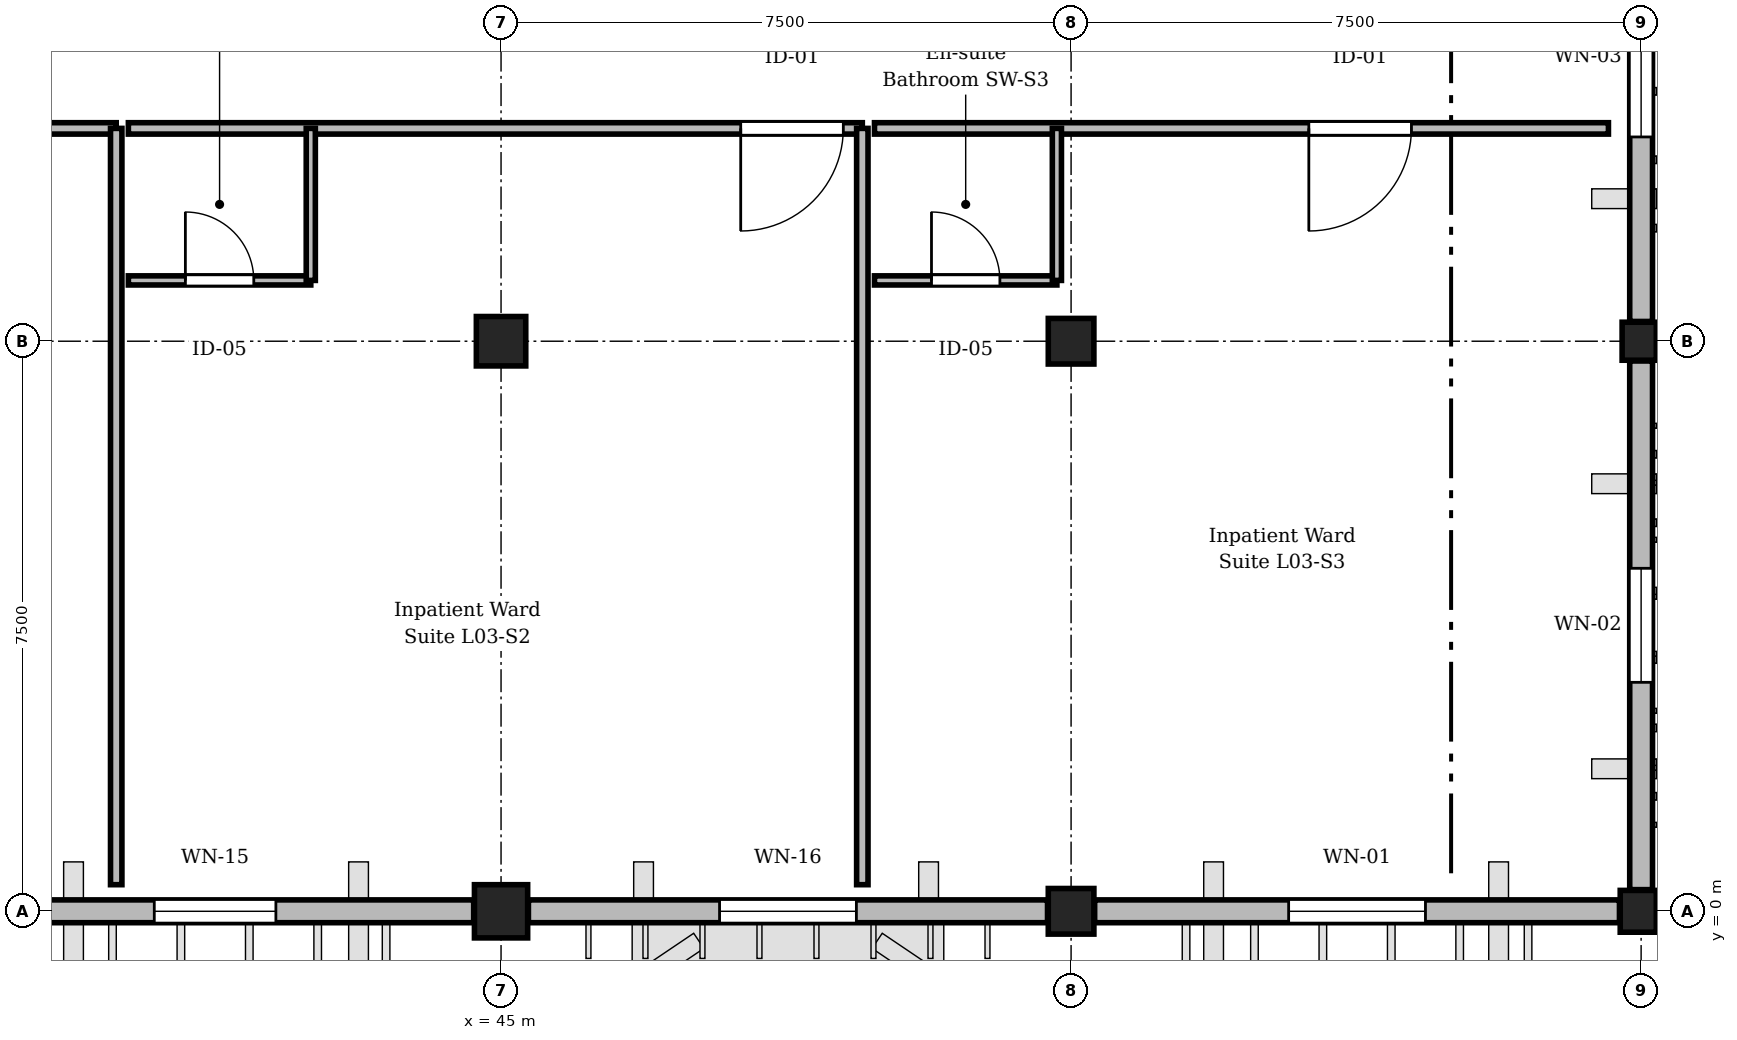
"""IFC4 building model, lengths in metres.
Left out: names, types, materials, properties, quantities, classifications, styles, units other than length and angle.
Written with IfcOpenShell. Run it as: python <this file> out.ifc"""

import sys

from ifc_helpers import new_model, si_unit, direction, frame, frame_2d, origin, origin_2d, place, context, subcontext, project, spatial, rectangle, extrude, element, fill, save


model = new_model("IFC4")
c1 = context("Model", 3, precision=1e-05, world=origin(), true_north=direction((0.0, 1.0)))
c2 = subcontext(c1, "Body", "Model", "MODEL_VIEW")
j1 = project(units=[si_unit("LENGTHUNIT", "METRE"), si_unit("PLANEANGLEUNIT", "RADIAN")], contexts=[c1])
p1 = place(None, origin())
s1 = spatial("IfcSite", under=j1, at=p1, CompositionType="ELEMENT")
p2 = place(p1, origin())
s2 = spatial("IfcBuilding", under=s1, at=p2, CompositionType="ELEMENT")
p3 = place(p2, frame((0.0, 0.0, 14.1)))
s3 = spatial("IfcBuildingStorey", under=s2, at=p3, CompositionType="ELEMENT", Elevation=14.1)
p4 = place(p3, frame((45.0, 0.0, 0.0), z_axis=(0.0, 0.0, 1.0), x_axis=(1.0, 0.0, 0.0)))
e1 = element("IfcColumn", 1, at=p4, inside=s3, PredefinedType="COLUMN", context=c2, shape_type="SweptSolid", body=[
    extrude(rectangle(XDim=0.7, YDim=0.7, at=origin_2d()), origin(), (0.0, 0.0, 1.0), 3.75),
])
p5 = place(p3, frame((45.0, 7.5, 0.0), z_axis=(0.0, 0.0, 1.0), x_axis=(1.0, 0.0, 0.0)))
e2 = element("IfcColumn", 2, at=p5, inside=s3, PredefinedType="COLUMN", context=c2, shape_type="SweptSolid", body=[
    extrude(rectangle(XDim=0.65, YDim=0.65, at=origin_2d()), origin(), (0.0, 0.0, 1.0), 3.75),
])
for number, where, z_axis, x_axis in (
    (3, (52.5, 0.0, 0.0), (0.0, 0.0, 1.0), (1.0, 0.0, 0.0)),
    (4, (52.5, 7.5, 0.0), (0.0, 0.0, 1.0), (1.0, 0.0, 0.0)),
):
    element("IfcColumn", number, at=place(p3, frame(where, z_axis=z_axis, x_axis=x_axis)), inside=s3, PredefinedType="COLUMN", context=c2, shape_type="SweptSolid", body=[
        extrude(rectangle(XDim=0.6, YDim=0.6, at=origin_2d()), origin(), (0.0, 0.0, 1.0), 3.75),
    ])
p6 = place(p3, frame((60.0, 0.0, 0.0), z_axis=(0.0, 0.0, 1.0), x_axis=(1.0, 0.0, 0.0)))
e5 = element("IfcColumn", 5, at=p6, inside=s3, PredefinedType="COLUMN", context=c2, shape_type="SweptSolid", body=[
    extrude(rectangle(XDim=0.55, YDim=0.55, at=origin_2d()), origin(), (0.0, 0.0, 1.0), 3.75),
])
p7 = place(p3, frame((60.0, 7.5, 0.0), z_axis=(0.0, 0.0, 1.0), x_axis=(1.0, 0.0, 0.0)))
e6 = element("IfcColumn", 6, at=p7, inside=s3, PredefinedType="COLUMN", context=c2, shape_type="SweptSolid", body=[
    extrude(rectangle(XDim=0.5, YDim=0.5, at=origin_2d()), origin(), (0.0, 0.0, 1.0), 3.75),
])
p8 = place(p3, frame((44.64, 0.0, 0.0), z_axis=(0.0, 0.0, 1.0), x_axis=(-1.0, 0.0, 0.0)))
e7 = element("IfcWall", 7, at=p8, inside=s3, PredefinedType="STANDARD", context=c2, shape_type="SweptSolid", body=[
    extrude(rectangle(XDim=6.805, YDim=0.3, at=frame_2d((3.402, 0.0))), origin(), (0.0, 0.0, 1.0), 2.87),
])
p9 = place(p8, frame((2.603, 0.0, 0.9)))
e8 = element("IfcOpeningElement", 8, at=p9, cuts=e7, PredefinedType="OPENING", context=c2, shape_type="SweptSolid", body=[
    extrude(rectangle(XDim=1.6, YDim=1.69, at=frame_2d((0.8, 0.845))), frame((0.0, 0.16, 0.0), z_axis=(0.0, -1.0, 0.0), x_axis=(1.0, 0.0, 0.0)), (0.0, 0.0, 1.0), 0.32),
])
p10 = place(p3, frame((52.19, 0.0, 0.0), z_axis=(0.0, 0.0, 1.0), x_axis=(-1.0, 0.0, 0.0)))
e9 = element("IfcWall", 9, at=p10, inside=s3, PredefinedType="STANDARD", context=c2, shape_type="SweptSolid", body=[
    extrude(rectangle(XDim=6.83, YDim=0.3, at=frame_2d((3.415, 0.0))), origin(), (0.0, 0.0, 1.0), 2.87),
])
p11 = place(p10, frame((2.515, 0.0, 0.9)))
e10 = element("IfcOpeningElement", 10, at=p11, cuts=e9, PredefinedType="OPENING", context=c2, shape_type="SweptSolid", body=[
    extrude(rectangle(XDim=1.8, YDim=1.69, at=frame_2d((0.9, 0.845))), frame((0.0, 0.16, 0.0), z_axis=(0.0, -1.0, 0.0), x_axis=(1.0, 0.0, 0.0)), (0.0, 0.0, 1.0), 0.32),
])
p12 = place(p3, frame((59.715, 0.0, 0.0), z_axis=(0.0, 0.0, 1.0), x_axis=(-1.0, 0.0, 0.0)))
e11 = element("IfcWall", 11, at=p12, inside=s3, PredefinedType="STANDARD", context=c2, shape_type="SweptSolid", body=[
    extrude(rectangle(XDim=6.905, YDim=0.3, at=frame_2d((3.453, 0.0))), origin(), (0.0, 0.0, 1.0), 2.87),
])
p13 = place(p12, frame((2.552, 0.0, 0.9)))
e12 = element("IfcOpeningElement", 12, at=p13, cuts=e11, PredefinedType="OPENING", context=c2, shape_type="SweptSolid", body=[
    extrude(rectangle(XDim=1.8, YDim=1.69, at=frame_2d((0.9, 0.845))), frame((0.0, 0.16, 0.0), z_axis=(0.0, -1.0, 0.0), x_axis=(1.0, 0.0, 0.0)), (0.0, 0.0, 1.0), 0.32),
])
p14 = place(p3, frame((60.0, 7.24, 0.0), z_axis=(0.0, 0.0, 1.0), x_axis=(0.0, -1.0, 0.0)))
e13 = element("IfcWall", 13, at=p14, inside=s3, PredefinedType="STANDARD", context=c2, shape_type="SweptSolid", body=[
    extrude(rectangle(XDim=6.955, YDim=0.3, at=frame_2d((3.478, 0.0))), origin(), (0.0, 0.0, 1.0), 2.87),
])
p15 = place(p14, frame((2.728, 0.0, 0.9)))
e14 = element("IfcOpeningElement", 14, at=p15, cuts=e13, PredefinedType="OPENING", context=c2, shape_type="SweptSolid", body=[
    extrude(rectangle(XDim=1.5, YDim=1.69, at=frame_2d((0.75, 0.845))), frame((0.0, 0.16, 0.0), z_axis=(0.0, -1.0, 0.0), x_axis=(1.0, 0.0, 0.0)), (0.0, 0.0, 1.0), 0.32),
])
p16 = place(p3, frame((60.0, 14.715, 0.0), z_axis=(0.0, 0.0, 1.0), x_axis=(0.0, -1.0, 0.0)))
e15 = element("IfcWall", 15, at=p16, inside=s3, PredefinedType="STANDARD", context=c2, shape_type="SweptSolid", body=[
    extrude(rectangle(XDim=6.955, YDim=0.3, at=frame_2d((3.478, 0.0))), origin(), (0.0, 0.0, 1.0), 2.87),
])
p17 = place(p16, frame((2.427, 0.0, 0.9)))
e16 = element("IfcOpeningElement", 16, at=p17, cuts=e15, PredefinedType="OPENING", context=c2, shape_type="SweptSolid", body=[
    extrude(rectangle(XDim=2.1, YDim=1.69, at=frame_2d((1.05, 0.845))), frame((0.0, 0.16, 0.0), z_axis=(0.0, -1.0, 0.0), x_axis=(1.0, 0.0, 0.0)), (0.0, 0.0, 1.0), 0.32),
])
p18 = place(p3, frame((39.937, 10.3, 0.0), z_axis=(0.0, 0.0, 1.0), x_axis=(-1.0, 0.0, 0.0)))
e17 = element("IfcWall", 17, at=p18, inside=s3, PredefinedType="PARTITIONING", context=c2, shape_type="SweptSolid", body=[
    extrude(rectangle(XDim=9.657, YDim=0.15, at=frame_2d((4.828, 0.0))), origin(), (0.0, 0.0, 1.0), 3.455),
])
p19 = place(p18, frame((4.934, 0.0, 0.0)))
e18 = element("IfcOpeningElement", 18, at=p19, cuts=e17, PredefinedType="OPENING", context=c2, shape_type="SweptSolid", body=[
    extrude(rectangle(XDim=1.35, YDim=2.25, at=frame_2d((0.675, 1.125))), frame((0.0, 0.085, 0.0), z_axis=(0.0, -1.0, 0.0), x_axis=(1.0, 0.0, 0.0)), (0.0, 0.0, 1.0), 0.17),
])
p20 = place(p3, frame((49.753, 10.3, 0.0), z_axis=(0.0, 0.0, 1.0), x_axis=(-1.0, 0.0, 0.0)))
e19 = element("IfcWall", 19, at=p20, inside=s3, PredefinedType="PARTITIONING", context=c2, shape_type="SweptSolid", body=[
    extrude(rectangle(XDim=9.657, YDim=0.15, at=frame_2d((4.828, 0.0))), origin(), (0.0, 0.0, 1.0), 3.455),
])
p21 = place(p20, frame((0.25, 0.0, 0.0)))
e20 = element("IfcOpeningElement", 20, at=p21, cuts=e19, PredefinedType="OPENING", context=c2, shape_type="SweptSolid", body=[
    extrude(rectangle(XDim=1.35, YDim=2.25, at=frame_2d((0.675, 1.125))), frame((0.0, 0.085, 0.0), z_axis=(0.0, -1.0, 0.0), x_axis=(1.0, 0.0, 0.0)), (0.0, 0.0, 1.0), 0.17),
])
p22 = place(p3, frame((40.097, 8.3, 0.0), z_axis=(0.0, 0.0, 1.0), x_axis=(1.0, 0.0, 0.0)))
e21 = element("IfcWall", 21, at=p22, inside=s3, PredefinedType="PARTITIONING", context=c2, shape_type="SweptSolid", body=[
    extrude(rectangle(XDim=2.4, YDim=0.12, at=frame_2d((1.2, 0.0))), origin(), (0.0, 0.0, 1.0), 3.455),
])
p23 = place(p22, frame((0.75, 0.0, 0.0)))
e22 = element("IfcOpeningElement", 22, at=p23, cuts=e21, PredefinedType="OPENING", context=c2, shape_type="SweptSolid", body=[
    extrude(rectangle(XDim=0.9, YDim=2.1, at=frame_2d((0.45, 1.05))), frame((0.0, 0.07, 0.0), z_axis=(0.0, -1.0, 0.0), x_axis=(1.0, 0.0, 0.0)), (0.0, 0.0, 1.0), 0.14),
])
p24 = place(p3, frame((42.497, 8.3, 0.0), z_axis=(0.0, 0.0, 1.0), x_axis=(0.0, 1.0, 0.0)))
e23 = element("IfcWall", 23, at=p24, inside=s3, PredefinedType="PARTITIONING", context=c2, shape_type="SweptSolid", body=[
    extrude(rectangle(XDim=2.0, YDim=0.12, at=frame_2d((1.0, 0.0))), origin(), (0.0, 0.0, 1.0), 3.455),
])
p25 = place(p3, frame((59.57, 10.3, 0.0), z_axis=(0.0, 0.0, 1.0), x_axis=(-1.0, 0.0, 0.0)))
e24 = element("IfcWall", 24, at=p25, inside=s3, PredefinedType="PARTITIONING", context=c2, shape_type="SweptSolid", body=[
    extrude(rectangle(XDim=9.657, YDim=0.15, at=frame_2d((4.828, 0.0))), origin(), (0.0, 0.0, 1.0), 3.455),
])
p26 = place(p25, frame((2.592, 0.0, 0.0)))
e25 = element("IfcOpeningElement", 25, at=p26, cuts=e24, PredefinedType="OPENING", context=c2, shape_type="SweptSolid", body=[
    extrude(rectangle(XDim=1.35, YDim=2.25, at=frame_2d((0.675, 1.125))), frame((0.0, 0.085, 0.0), z_axis=(0.0, -1.0, 0.0), x_axis=(1.0, 0.0, 0.0)), (0.0, 0.0, 1.0), 0.17),
])
p27 = place(p3, frame((49.913, 8.3, 0.0), z_axis=(0.0, 0.0, 1.0), x_axis=(1.0, 0.0, 0.0)))
e26 = element("IfcWall", 26, at=p27, inside=s3, PredefinedType="PARTITIONING", context=c2, shape_type="SweptSolid", body=[
    extrude(rectangle(XDim=2.4, YDim=0.12, at=frame_2d((1.2, 0.0))), origin(), (0.0, 0.0, 1.0), 3.455),
])
p28 = place(p27, frame((0.75, 0.0, 0.0)))
e27 = element("IfcOpeningElement", 27, at=p28, cuts=e26, PredefinedType="OPENING", context=c2, shape_type="SweptSolid", body=[
    extrude(rectangle(XDim=0.9, YDim=2.1, at=frame_2d((0.45, 1.05))), frame((0.0, 0.07, 0.0), z_axis=(0.0, -1.0, 0.0), x_axis=(1.0, 0.0, 0.0)), (0.0, 0.0, 1.0), 0.14),
])
p29 = place(p3, frame((52.313, 8.3, 0.0), z_axis=(0.0, 0.0, 1.0), x_axis=(0.0, 1.0, 0.0)))
e28 = element("IfcWall", 28, at=p29, inside=s3, PredefinedType="PARTITIONING", context=c2, shape_type="SweptSolid", body=[
    extrude(rectangle(XDim=2.0, YDim=0.12, at=frame_2d((1.0, 0.0))), origin(), (0.0, 0.0, 1.0), 2.905),
])
for number, where, z_axis, x_axis in (
    (29, (39.937, 0.35, 0.0), (0.0, 0.0, 1.0), (0.0, 1.0, 0.0)),
    (30, (49.753, 0.35, 0.0), (0.0, 0.0, 1.0), (0.0, 1.0, 0.0)),
):
    element("IfcWall", number, at=place(p3, frame(where, z_axis=z_axis, x_axis=x_axis)), inside=s3, PredefinedType="PARTITIONING", context=c2, shape_type="SweptSolid", body=[
        extrude(rectangle(XDim=9.95, YDim=0.15, at=frame_2d((4.975, 0.0))), origin(), (0.0, 0.0, 1.0), 3.455),
    ])
p30 = place(p9, origin())
e31 = element("IfcWindow", 31, at=p30, inside=s3, PartitioningType="SINGLE_PANEL", PredefinedType="WINDOW", context=c2, shape_type="SweptSolid", body=[
    extrude(rectangle(XDim=1.6, YDim=1.69, at=frame_2d((0.8, 0.845))), frame((0.0, 0.03, 0.0), z_axis=(0.0, -1.0, 0.0), x_axis=(1.0, 0.0, 0.0)), (0.0, 0.0, 1.0), 0.06),
])
fill(e8, e31)
p31 = place(p11, origin())
e32 = element("IfcWindow", 32, at=p31, inside=s3, PartitioningType="SINGLE_PANEL", PredefinedType="WINDOW", context=c2, shape_type="SweptSolid", body=[
    extrude(rectangle(XDim=1.8, YDim=1.69, at=frame_2d((0.9, 0.845))), frame((0.0, 0.03, 0.0), z_axis=(0.0, -1.0, 0.0), x_axis=(1.0, 0.0, 0.0)), (0.0, 0.0, 1.0), 0.06),
])
fill(e10, e32)
p32 = place(p13, origin())
e33 = element("IfcWindow", 33, at=p32, inside=s3, PartitioningType="SINGLE_PANEL", PredefinedType="WINDOW", context=c2, shape_type="SweptSolid", body=[
    extrude(rectangle(XDim=1.8, YDim=1.69, at=frame_2d((0.9, 0.845))), frame((0.0, 0.03, 0.0), z_axis=(0.0, -1.0, 0.0), x_axis=(1.0, 0.0, 0.0)), (0.0, 0.0, 1.0), 0.06),
])
fill(e12, e33)
p33 = place(p15, origin())
e34 = element("IfcWindow", 34, at=p33, inside=s3, PartitioningType="SINGLE_PANEL", PredefinedType="WINDOW", context=c2, shape_type="SweptSolid", body=[
    extrude(rectangle(XDim=1.5, YDim=1.69, at=frame_2d((0.75, 0.845))), frame((0.0, 0.03, 0.0), z_axis=(0.0, -1.0, 0.0), x_axis=(1.0, 0.0, 0.0)), (0.0, 0.0, 1.0), 0.06),
])
fill(e14, e34)
p34 = place(p17, origin())
e35 = element("IfcWindow", 35, at=p34, inside=s3, PartitioningType="SINGLE_PANEL", PredefinedType="WINDOW", context=c2, shape_type="SweptSolid", body=[
    extrude(rectangle(XDim=2.1, YDim=1.69, at=frame_2d((1.05, 0.845))), frame((0.0, 0.03, 0.0), z_axis=(0.0, -1.0, 0.0), x_axis=(1.0, 0.0, 0.0)), (0.0, 0.0, 1.0), 0.06),
])
fill(e16, e35)
p35 = place(p21, origin())
e36 = element("IfcDoor", 36, at=p35, inside=s3, OperationType="SINGLE_SWING_RIGHT", PredefinedType="DOOR", context=c2, shape_type="SweptSolid", body=[
    extrude(rectangle(XDim=1.35, YDim=2.25, at=frame_2d((0.675, 1.125))), frame((0.0, 0.025, 0.0), z_axis=(0.0, -1.0, 0.0), x_axis=(1.0, 0.0, 0.0)), (0.0, 0.0, 1.0), 0.05),
])
fill(e20, e36)
p36 = place(p23, origin())
e37 = element("IfcDoor", 37, at=p36, inside=s3, OperationType="SINGLE_SWING_LEFT", PredefinedType="DOOR", context=c2, shape_type="SweptSolid", body=[
    extrude(rectangle(XDim=0.9, YDim=2.1, at=frame_2d((0.45, 1.05))), frame((0.0, 0.025, 0.0), z_axis=(0.0, -1.0, 0.0), x_axis=(1.0, 0.0, 0.0)), (0.0, 0.0, 1.0), 0.05),
])
fill(e22, e37)
p37 = place(p26, origin())
e38 = element("IfcDoor", 38, at=p37, inside=s3, OperationType="SINGLE_SWING_RIGHT", PredefinedType="DOOR", context=c2, shape_type="SweptSolid", body=[
    extrude(rectangle(XDim=1.35, YDim=2.25, at=frame_2d((0.675, 1.125))), frame((0.0, 0.025, 0.0), z_axis=(0.0, -1.0, 0.0), x_axis=(1.0, 0.0, 0.0)), (0.0, 0.0, 1.0), 0.05),
])
fill(e25, e38)
p38 = place(p28, origin())
e39 = element("IfcDoor", 39, at=p38, inside=s3, OperationType="SINGLE_SWING_LEFT", PredefinedType="DOOR", context=c2, shape_type="SweptSolid", body=[
    extrude(rectangle(XDim=0.9, YDim=2.1, at=frame_2d((0.45, 1.05))), frame((0.0, 0.025, 0.0), z_axis=(0.0, -1.0, 0.0), x_axis=(1.0, 0.0, 0.0)), (0.0, 0.0, 1.0), 0.05),
])
fill(e27, e39)
save(model, sys.argv[1])
